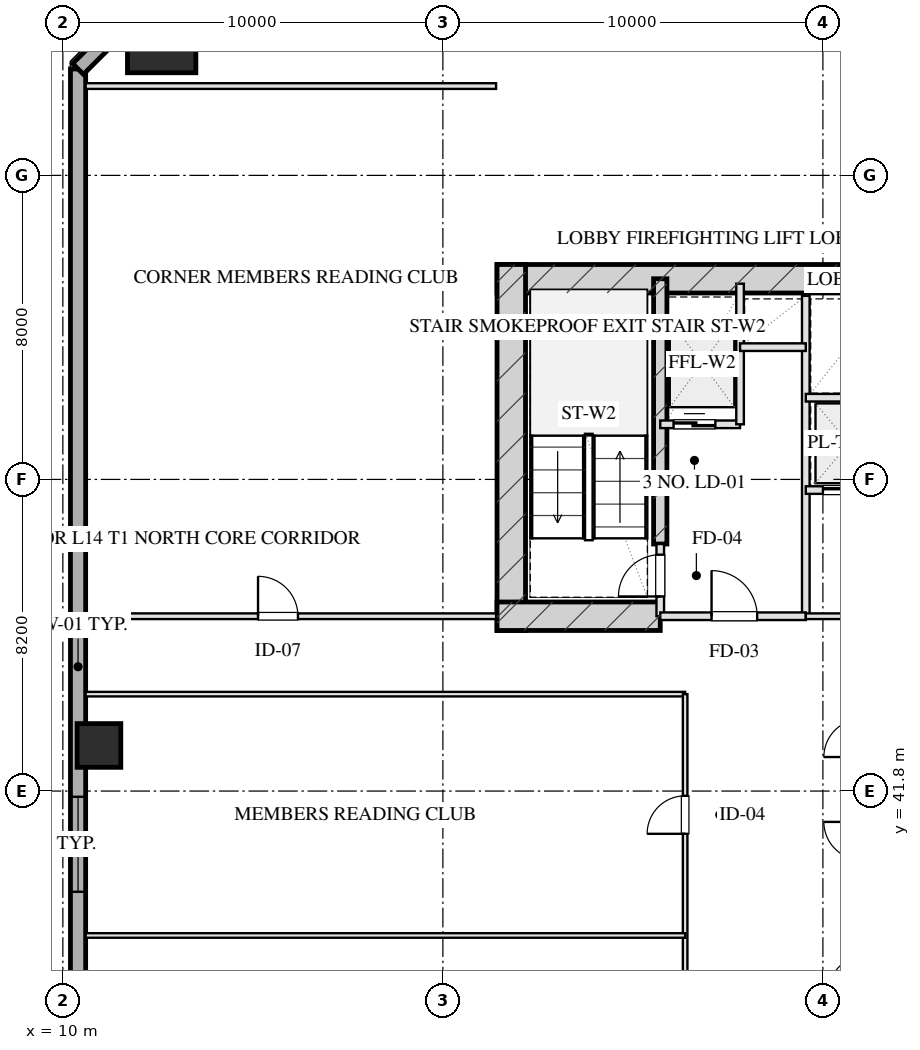
"""IFC4 building model, lengths in metres.
Left out: names, types, materials, properties, quantities, classifications, styles, units other than length and angle.
Written with IfcOpenShell. Run it as: python <this file> out.ifc"""

import sys

from ifc_helpers import new_model, si_unit, direction, frame, frame_2d, origin, origin_2d, place, context, subcontext, project, spatial, rectangle, hollow_rectangle, extrude, element, fill, save


model = new_model("IFC4")
c1 = context("Model", 3, precision=1e-05, world=origin(), true_north=direction((0.0, 1.0)))
c2 = subcontext(c1, "Body", "Model", "MODEL_VIEW")
j1 = project(units=[si_unit("LENGTHUNIT", "METRE"), si_unit("PLANEANGLEUNIT", "RADIAN")], contexts=[c1])
p1 = place(None, origin())
s1 = spatial("IfcSite", under=j1, at=p1, CompositionType="ELEMENT")
p2 = place(p1, origin())
s2 = spatial("IfcBuilding", under=s1, at=p2, CompositionType="ELEMENT")
p3 = place(p2, frame((0.0, 0.0, 60.95)))
s3 = spatial("IfcBuildingStorey", under=s2, at=p3, CompositionType="ELEMENT", Elevation=60.95)
p4 = place(p3, frame((21.425, 55.28, 0.0), z_axis=(0.0, 0.0, 1.0), x_axis=(1.0, 0.0, 0.0)))
e1 = element("IfcWall", 1, at=p4, inside=s3, PredefinedType="SHEAR", context=c2, shape_type="SweptSolid", body=[
    extrude(rectangle(XDim=17.15, YDim=0.75, at=frame_2d((8.575, 0.0))), origin(), (0.0, 0.0, 1.0), 3.45),
])
p5 = place(p3, frame((21.8, 46.025, 0.0), z_axis=(0.0, 0.0, 1.0), x_axis=(0.0, 1.0, 0.0)))
e2 = element("IfcWall", 2, at=p5, inside=s3, PredefinedType="SHEAR", context=c2, shape_type="SweptSolid", body=[
    extrude(rectangle(XDim=9.63, YDim=0.75, at=frame_2d((4.815, 0.0))), origin(), (0.0, 0.0, 1.0), 3.45),
])
p6 = place(p3, frame((25.72, 48.3, 0.0), z_axis=(0.0, 0.0, 1.0), x_axis=(0.0, 1.0, 0.0)))
e3 = element("IfcWall", 3, at=p6, inside=s3, PredefinedType="SHEAR", context=c2, shape_type="SweptSolid", body=[
    extrude(rectangle(XDim=6.98, YDim=0.35, at=frame_2d((3.49, 0.0))), origin(), (0.0, 0.0, 1.0), 3.45),
])
p7 = place(p3, frame((21.425, 46.4, 0.0), z_axis=(0.0, 0.0, 1.0), x_axis=(1.0, 0.0, 0.0)))
e4 = element("IfcWall", 4, at=p7, inside=s3, PredefinedType="SHEAR", context=c2, shape_type="SweptSolid", body=[
    extrude(rectangle(XDim=4.295, YDim=0.75, at=frame_2d((2.147, 0.0))), origin(), (0.0, 0.0, 1.0), 3.45),
])
p8 = place(p3, frame((12.6, 61.6, 0.0), z_axis=(0.0, 0.0, 1.0), x_axis=(1.0, 0.0, 0.0)))
e5 = element("IfcColumn", 5, at=p8, inside=s3, PredefinedType="COLUMN", context=c2, shape_type="SweptSolid", body=[
    extrude(hollow_rectangle(XDim=1.8, YDim=1.8, WallThickness=0.06, at=origin_2d()), origin(), (0.0, 0.0, 1.0), 3.451),
])
p9 = place(p3, frame((10.95, 43.0, 0.0), z_axis=(0.0, 0.0, 1.0), x_axis=(1.0, 0.0, 0.0)))
e6 = element("IfcColumn", 6, at=p9, inside=s3, PredefinedType="COLUMN", context=c2, shape_type="SweptSolid", body=[
    extrude(hollow_rectangle(XDim=1.15, YDim=1.15, WallThickness=0.04, at=origin_2d()), origin(), (0.0, 0.0, 1.0), 3.451),
])
p10 = place(p3, frame((10.4, 7.2, 0.0), z_axis=(0.0, 0.0, 1.0), x_axis=(0.0, 1.0, 0.0)))
e7 = element("IfcWall", 7, at=p10, inside=s3, PredefinedType="SOLIDWALL", context=c2, shape_type="SweptSolid", body=[
    extrude(rectangle(XDim=53.6, YDim=0.4, at=frame_2d((26.8, 0.0))), origin(), (0.0, 0.0, 1.0), 2.61),
])
p11 = place(p10, frame((31.95, 0.0, 0.75)))
e8 = element("IfcOpeningElement", 8, at=p11, cuts=e7, PredefinedType="OPENING", context=c2, shape_type="SweptSolid", body=[
    extrude(rectangle(XDim=2.5, YDim=1.46, at=frame_2d((1.25, 0.73))), frame((0.0, 0.21, 0.0), z_axis=(0.0, -1.0, 0.0), x_axis=(1.0, 0.0, 0.0)), (0.0, 0.0, 1.0), 0.42),
])
p12 = place(p10, frame((20.292, 0.0, 0.0)))
e9 = element("IfcOpeningElement", 9, at=p12, cuts=e7, PredefinedType="OPENING", context=c2, shape_type="SweptSolid", body=[
    extrude(rectangle(XDim=1.1, YDim=2.15, at=frame_2d((0.55, 1.075))), frame((0.0, 0.21, 0.0), z_axis=(0.0, -1.0, 0.0), x_axis=(1.0, 0.0, 0.0)), (0.0, 0.0, 1.0), 0.42),
])
p13 = place(p3, frame((10.4, 60.8, 0.0), z_axis=(0.0, 0.0, 1.0), x_axis=(0.707106781187, 0.707106781187, 0.0)))
e10 = element("IfcWall", 10, at=p13, inside=s3, PredefinedType="SOLIDWALL", context=c2, shape_type="SweptSolid", body=[
    extrude(rectangle(XDim=4.243, YDim=0.4, at=frame_2d((2.121, 0.0))), origin(), (0.0, 0.0, 1.0), 2.61),
])
p14 = place(p3, frame((25.72, 46.4, 0.0), z_axis=(0.0, 0.0, 1.0), x_axis=(0.0, 1.0, 0.0)))
e11 = element("IfcWall", 11, at=p14, inside=s3, PredefinedType="PARTITIONING", context=c2, shape_type="SweptSolid", body=[
    extrude(rectangle(XDim=1.9, YDim=0.2, at=frame_2d((0.95, 0.0))), origin(), (0.0, 0.0, 1.0), 3.175),
])
p15 = place(p14, frame((0.52, 0.0, 0.0)))
e12 = element("IfcOpeningElement", 12, at=p15, cuts=e11, PredefinedType="OPENING", context=c2, shape_type="SweptSolid", body=[
    extrude(rectangle(XDim=1.1, YDim=2.05, at=frame_2d((0.55, 1.025))), frame((0.0, 0.11, 0.0), z_axis=(0.0, -1.0, 0.0), x_axis=(1.0, 0.0, 0.0)), (0.0, 0.0, 1.0), 0.22),
])
p16 = place(p3, frame((29.55, 46.4, 0.0), z_axis=(0.0, 0.0, 1.0), x_axis=(0.0, 1.0, 0.0)))
e13 = element("IfcWall", 13, at=p16, inside=s3, PredefinedType="PARTITIONING", context=c2, shape_type="SweptSolid", body=[
    extrude(rectangle(XDim=8.43, YDim=0.2, at=frame_2d((4.215, 0.0))), origin(), (0.0, 0.0, 1.0), 3.175),
])
p17 = place(p3, frame((25.72, 46.4, 0.0), z_axis=(0.0, 0.0, 1.0), x_axis=(1.0, 0.0, 0.0)))
e14 = element("IfcWall", 14, at=p17, inside=s3, PredefinedType="PARTITIONING", context=c2, shape_type="SweptSolid", body=[
    extrude(rectangle(XDim=3.83, YDim=0.2, at=frame_2d((1.915, 0.0))), origin(), (0.0, 0.0, 1.0), 3.175),
])
p18 = place(p17, frame((1.35, 0.0, 0.0)))
e15 = element("IfcOpeningElement", 15, at=p18, cuts=e14, PredefinedType="OPENING", context=c2, shape_type="SweptSolid", body=[
    extrude(rectangle(XDim=1.2, YDim=2.05, at=frame_2d((0.6, 1.025))), frame((0.0, 0.11, 0.0), z_axis=(0.0, -1.0, 0.0), x_axis=(1.0, 0.0, 0.0)), (0.0, 0.0, 1.0), 0.22),
])
p19 = place(p3, frame((25.72, 51.45, 0.0), z_axis=(0.0, 0.0, 1.0), x_axis=(1.0, 0.0, 0.0)))
e16 = element("IfcWall", 16, at=p19, inside=s3, PredefinedType="PARTITIONING", context=c2, shape_type="SweptSolid", body=[
    extrude(rectangle(XDim=2.1, YDim=0.2, at=frame_2d((1.05, 0.0))), origin(), (0.0, 0.0, 1.0), 3.175),
])
p20 = place(p19, frame((0.35, 0.0, 0.0)))
e17 = element("IfcOpeningElement", 17, at=p20, cuts=e16, PredefinedType="OPENING", context=c2, shape_type="SweptSolid", body=[
    extrude(rectangle(XDim=1.1, YDim=2.05, at=frame_2d((0.55, 1.025))), frame((0.0, 0.11, 0.0), z_axis=(0.0, -1.0, 0.0), x_axis=(1.0, 0.0, 0.0)), (0.0, 0.0, 1.0), 0.22),
])
p21 = place(p3, frame((27.82, 51.45, 0.0), z_axis=(0.0, 0.0, 1.0), x_axis=(0.0, 1.0, 0.0)))
e18 = element("IfcWall", 18, at=p21, inside=s3, PredefinedType="PARTITIONING", context=c2, shape_type="SweptSolid", body=[
    extrude(rectangle(XDim=3.7, YDim=0.2, at=frame_2d((1.85, 0.0))), origin(), (0.0, 0.0, 1.0), 3.175),
])
p22 = place(p3, frame((27.82, 53.48, 0.0), z_axis=(0.0, 0.0, 1.0), x_axis=(1.0, 0.0, 0.0)))
e19 = element("IfcWall", 19, at=p22, inside=s3, PredefinedType="PARTITIONING", context=c2, shape_type="SweptSolid", body=[
    extrude(rectangle(XDim=1.73, YDim=0.2, at=frame_2d((0.865, 0.0))), origin(), (0.0, 0.0, 1.0), 3.175),
])
p23 = place(p3, frame((29.55, 46.4, 0.0), z_axis=(0.0, 0.0, 1.0), x_axis=(1.0, 0.0, 0.0)))
e20 = element("IfcWall", 20, at=p23, inside=s3, PredefinedType="PARTITIONING", context=c2, shape_type="SweptSolid", body=[
    extrude(rectangle(XDim=4.4, YDim=0.15, at=frame_2d((2.2, 0.0))), origin(), (0.0, 0.0, 1.0), 3.175),
])
p24 = place(p23, frame((1.45, 0.0, 0.0)))
e21 = element("IfcOpeningElement", 21, at=p24, cuts=e20, PredefinedType="OPENING", context=c2, shape_type="SweptSolid", body=[
    extrude(rectangle(XDim=1.5, YDim=2.05, at=frame_2d((0.75, 1.025))), frame((0.0, 0.085, 0.0), z_axis=(0.0, -1.0, 0.0), x_axis=(1.0, 0.0, 0.0)), (0.0, 0.0, 1.0), 0.17),
])
p25 = place(p3, frame((29.55, 49.72, 0.0), z_axis=(0.0, 0.0, 1.0), x_axis=(1.0, 0.0, 0.0)))
e22 = element("IfcWall", 22, at=p25, inside=s3, PredefinedType="PARTITIONING", context=c2, shape_type="SweptSolid", body=[
    extrude(rectangle(XDim=4.4, YDim=0.2, at=frame_2d((2.2, 0.0))), origin(), (0.0, 0.0, 1.0), 3.175),
])
p26 = place(p25, frame((0.45, 0.0, 0.0)))
e23 = element("IfcOpeningElement", 23, at=p26, cuts=e22, PredefinedType="OPENING", context=c2, shape_type="SweptSolid", body=[
    extrude(rectangle(XDim=1.1, YDim=2.05, at=frame_2d((0.55, 1.025))), frame((0.0, 0.11, 0.0), z_axis=(0.0, -1.0, 0.0), x_axis=(1.0, 0.0, 0.0)), (0.0, 0.0, 1.0), 0.22),
])
p27 = place(p25, frame((2.55, 0.0, 0.0)))
e24 = element("IfcOpeningElement", 24, at=p27, cuts=e22, PredefinedType="OPENING", context=c2, shape_type="SweptSolid", body=[
    extrude(rectangle(XDim=1.1, YDim=2.05, at=frame_2d((0.55, 1.025))), frame((0.0, 0.11, 0.0), z_axis=(0.0, -1.0, 0.0), x_axis=(1.0, 0.0, 0.0)), (0.0, 0.0, 1.0), 0.22),
])
p28 = place(p3, frame((29.55, 52.15, 0.0), z_axis=(0.0, 0.0, 1.0), x_axis=(1.0, 0.0, 0.0)))
e25 = element("IfcWall", 25, at=p28, inside=s3, PredefinedType="PARTITIONING", context=c2, shape_type="SweptSolid", body=[
    extrude(rectangle(XDim=4.4, YDim=0.2, at=frame_2d((2.2, 0.0))), origin(), (0.0, 0.0, 1.0), 3.175),
])
p29 = place(p3, frame((10.6, 60.35, 0.0), z_axis=(0.0, 0.0, 1.0), x_axis=(1.0, 0.0, 0.0)))
e26 = element("IfcWall", 26, at=p29, inside=s3, PredefinedType="PARTITIONING", context=c2, shape_type="SweptSolid", body=[
    extrude(rectangle(XDim=10.8, YDim=0.15, at=frame_2d((5.4, 0.0))), origin(), (0.0, 0.0, 1.0), 3.175),
])
p30 = place(p3, frame((10.6, 46.4, 0.0), z_axis=(0.0, 0.0, 1.0), x_axis=(1.0, 0.0, 0.0)))
e27 = element("IfcWall", 27, at=p30, inside=s3, PredefinedType="PARTITIONING", context=c2, shape_type="SweptSolid", body=[
    extrude(rectangle(XDim=10.8, YDim=0.15, at=frame_2d((5.4, 0.0))), origin(), (0.0, 0.0, 1.0), 3.175),
])
p31 = place(p30, frame((4.536, 0.0, 0.0)))
e28 = element("IfcOpeningElement", 28, at=p31, cuts=e27, PredefinedType="OPENING", context=c2, shape_type="SweptSolid", body=[
    extrude(rectangle(XDim=1.05, YDim=2.05, at=frame_2d((0.525, 1.025))), frame((0.0, 0.085, 0.0), z_axis=(0.0, -1.0, 0.0), x_axis=(1.0, 0.0, 0.0)), (0.0, 0.0, 1.0), 0.17),
])
p32 = place(p3, frame((10.6, 44.35, 0.0), z_axis=(0.0, 0.0, 1.0), x_axis=(1.0, 0.0, 0.0)))
e29 = element("IfcWall", 29, at=p32, inside=s3, PredefinedType="PARTITIONING", context=c2, shape_type="SweptSolid", body=[
    extrude(rectangle(XDim=15.775, YDim=0.12, at=frame_2d((7.887, 0.0))), origin(), (0.0, 0.0, 1.0), 3.175),
])
p33 = place(p3, frame((26.375, 23.65, 0.0), z_axis=(0.0, 0.0, 1.0), x_axis=(0.0, 1.0, 0.0)))
e30 = element("IfcWall", 30, at=p33, inside=s3, PredefinedType="PARTITIONING", context=c2, shape_type="SweptSolid", body=[
    extrude(rectangle(XDim=20.7, YDim=0.12, at=frame_2d((10.35, 0.0))), origin(), (0.0, 0.0, 1.0), 3.175),
])
p34 = place(p33, frame((2.518, 0.0, 0.0)))
e31 = element("IfcOpeningElement", 31, at=p34, cuts=e30, PredefinedType="OPENING", context=c2, shape_type="SweptSolid", body=[
    extrude(rectangle(XDim=1.0, YDim=2.05, at=frame_2d((0.5, 1.025))), frame((0.0, 0.07, 0.0), z_axis=(0.0, -1.0, 0.0), x_axis=(1.0, 0.0, 0.0)), (0.0, 0.0, 1.0), 0.14),
])
p35 = place(p33, frame((9.692, 0.0, 0.0)))
e32 = element("IfcOpeningElement", 32, at=p35, cuts=e30, PredefinedType="OPENING", context=c2, shape_type="SweptSolid", body=[
    extrude(rectangle(XDim=1.0, YDim=2.05, at=frame_2d((0.5, 1.025))), frame((0.0, 0.07, 0.0), z_axis=(0.0, -1.0, 0.0), x_axis=(1.0, 0.0, 0.0)), (0.0, 0.0, 1.0), 0.14),
])
p36 = place(p33, frame((17.025, 0.0, 0.0)))
e33 = element("IfcOpeningElement", 33, at=p36, cuts=e30, PredefinedType="OPENING", context=c2, shape_type="SweptSolid", body=[
    extrude(rectangle(XDim=1.0, YDim=2.05, at=frame_2d((0.5, 1.025))), frame((0.0, 0.07, 0.0), z_axis=(0.0, -1.0, 0.0), x_axis=(1.0, 0.0, 0.0)), (0.0, 0.0, 1.0), 0.14),
])
p37 = place(p3, frame((10.6, 38.0, 0.0), z_axis=(0.0, 0.0, 1.0), x_axis=(1.0, 0.0, 0.0)))
e34 = element("IfcWall", 34, at=p37, inside=s3, PredefinedType="PARTITIONING", context=c2, shape_type="SweptSolid", body=[
    extrude(rectangle(XDim=15.775, YDim=0.12, at=frame_2d((7.887, 0.0))), origin(), (0.0, 0.0, 1.0), 3.175),
])
p38 = place(p11, origin())
e35 = element("IfcWindow", 35, at=p38, inside=s3, PartitioningType="TRIPLE_PANEL_VERTICAL", PredefinedType="WINDOW", context=c2, shape_type="SweptSolid", body=[
    extrude(rectangle(XDim=2.5, YDim=1.46, at=frame_2d((1.25, 0.73))), frame((0.0, 0.03, 0.0), z_axis=(0.0, -1.0, 0.0), x_axis=(1.0, 0.0, 0.0)), (0.0, 0.0, 1.0), 0.06),
])
fill(e8, e35)
p39 = place(p15, origin())
e36 = element("IfcDoor", 36, at=p39, inside=s3, OperationType="SINGLE_SWING_LEFT", PredefinedType="DOOR", context=c2, shape_type="SweptSolid", body=[
    extrude(rectangle(XDim=1.1, YDim=2.05, at=frame_2d((0.55, 1.025))), frame((0.0, 0.025, 0.0), z_axis=(0.0, -1.0, 0.0), x_axis=(1.0, 0.0, 0.0)), (0.0, 0.0, 1.0), 0.05),
])
fill(e12, e36)
p40 = place(p18, origin())
e37 = element("IfcDoor", 37, at=p40, inside=s3, OperationType="SINGLE_SWING_LEFT", PredefinedType="DOOR", context=c2, shape_type="SweptSolid", body=[
    extrude(rectangle(XDim=1.2, YDim=2.05, at=frame_2d((0.6, 1.025))), frame((0.0, 0.025, 0.0), z_axis=(0.0, -1.0, 0.0), x_axis=(1.0, 0.0, 0.0)), (0.0, 0.0, 1.0), 0.05),
])
fill(e15, e37)
p41 = place(p20, origin())
e38 = element("IfcDoor", 38, at=p41, inside=s3, OperationType="DOUBLE_DOOR_SLIDING", PredefinedType="DOOR", context=c2, shape_type="SweptSolid", body=[
    extrude(rectangle(XDim=1.1, YDim=2.05, at=frame_2d((0.55, 1.025))), frame((0.0, 0.025, 0.0), z_axis=(0.0, -1.0, 0.0), x_axis=(1.0, 0.0, 0.0)), (0.0, 0.0, 1.0), 0.05),
])
fill(e17, e38)
p42 = place(p26, origin())
e39 = element("IfcDoor", 39, at=p42, inside=s3, OperationType="DOUBLE_DOOR_SLIDING", PredefinedType="DOOR", context=c2, shape_type="SweptSolid", body=[
    extrude(rectangle(XDim=1.1, YDim=2.05, at=frame_2d((0.55, 1.025))), frame((0.0, 0.025, 0.0), z_axis=(0.0, -1.0, 0.0), x_axis=(1.0, 0.0, 0.0)), (0.0, 0.0, 1.0), 0.05),
])
fill(e23, e39)
p43 = place(p31, origin())
e40 = element("IfcDoor", 40, at=p43, inside=s3, OperationType="SINGLE_SWING_LEFT", PredefinedType="DOOR", context=c2, shape_type="SweptSolid", body=[
    extrude(rectangle(XDim=1.05, YDim=2.05, at=frame_2d((0.525, 1.025))), frame((0.0, 0.025, 0.0), z_axis=(0.0, -1.0, 0.0), x_axis=(1.0, 0.0, 0.0)), (0.0, 0.0, 1.0), 0.05),
])
fill(e28, e40)
p44 = place(p36, origin())
e41 = element("IfcDoor", 41, at=p44, inside=s3, OperationType="SINGLE_SWING_LEFT", PredefinedType="DOOR", context=c2, shape_type="SweptSolid", body=[
    extrude(rectangle(XDim=1.0, YDim=2.05, at=frame_2d((0.5, 1.025))), frame((0.0, 0.025, 0.0), z_axis=(0.0, -1.0, 0.0), x_axis=(1.0, 0.0, 0.0)), (0.0, 0.0, 1.0), 0.05),
])
fill(e33, e41)
save(model, sys.argv[1])
